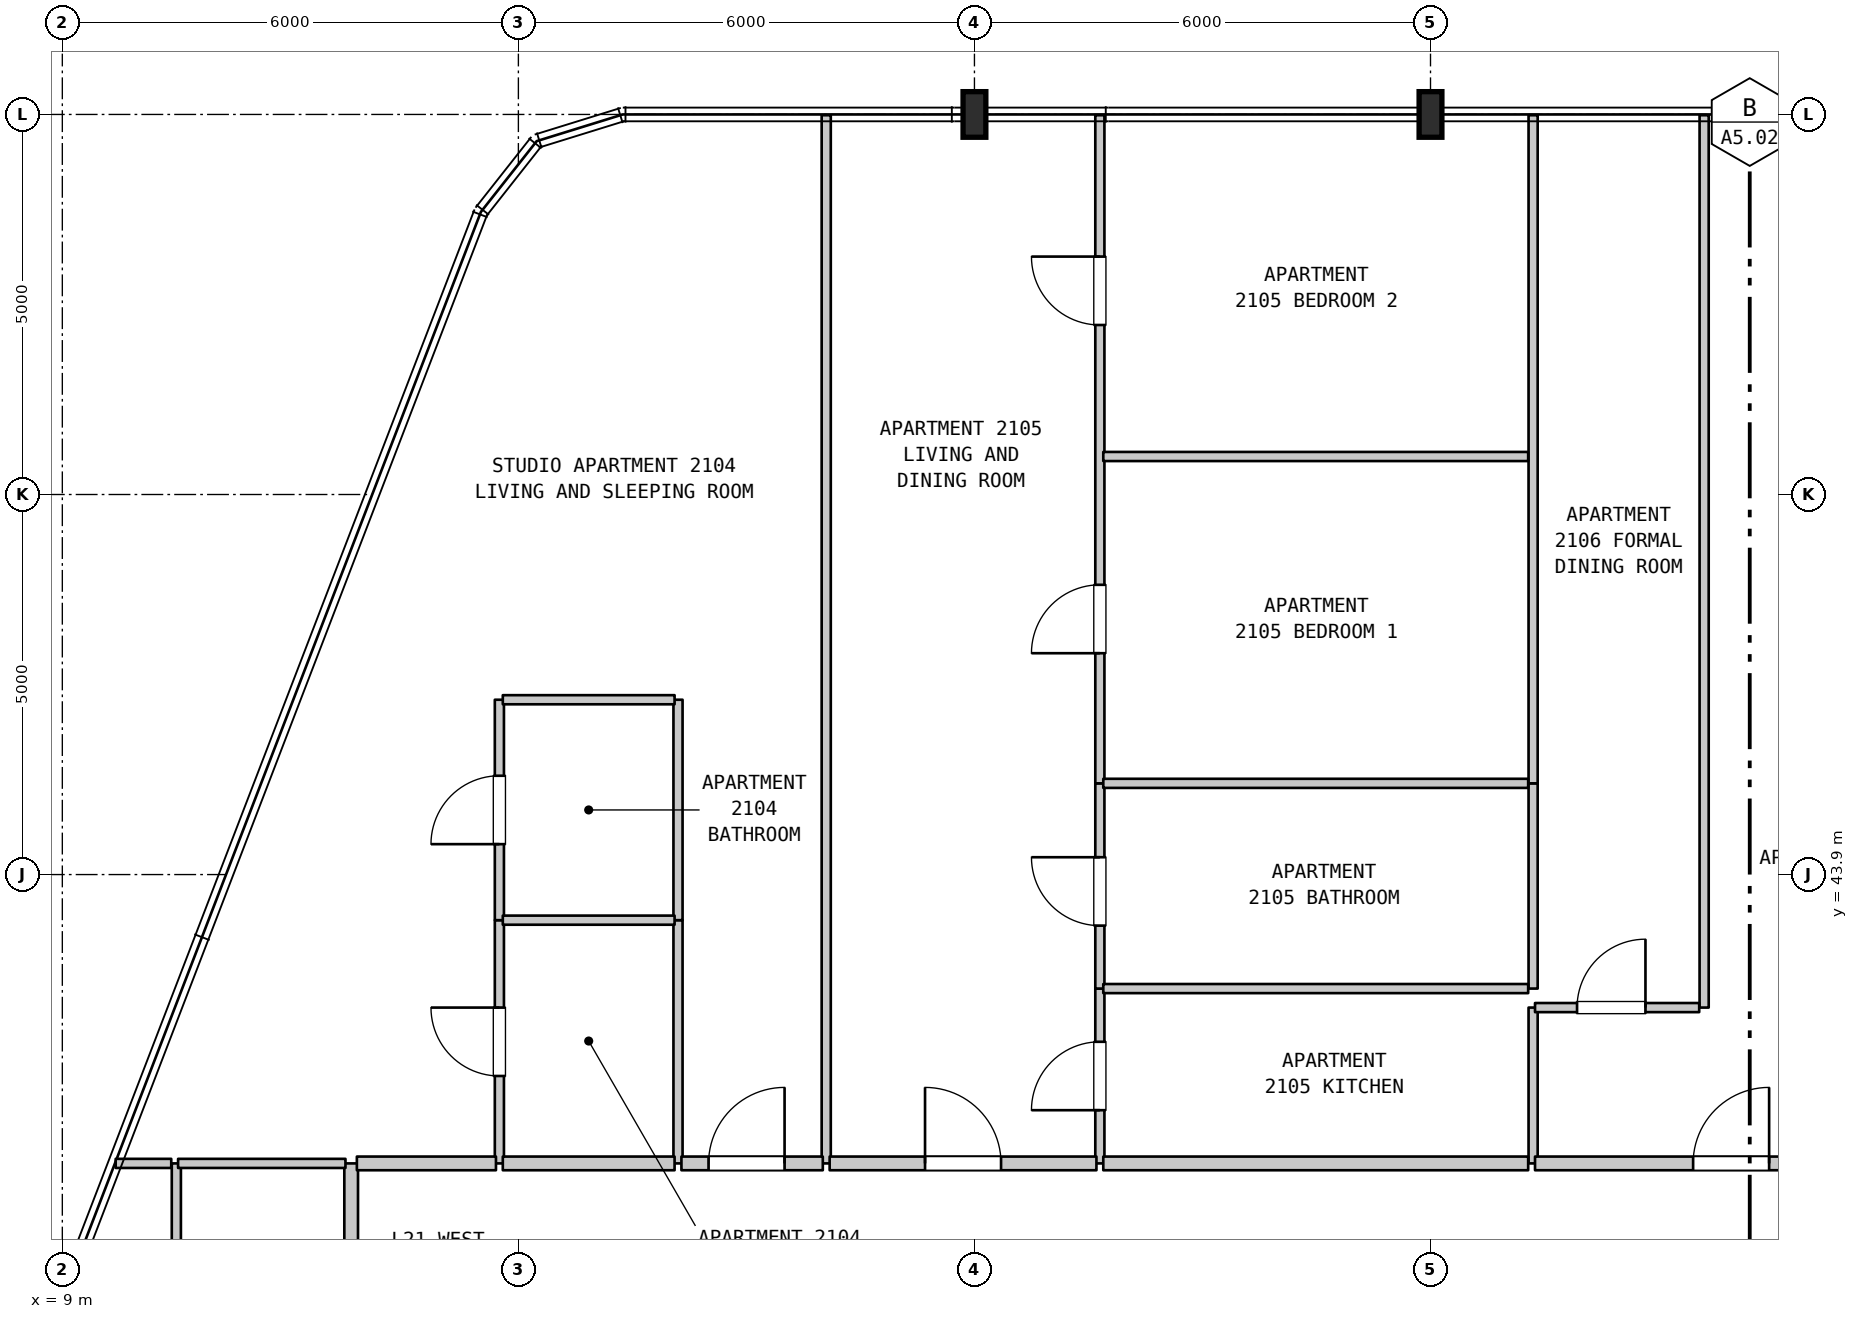
"""IFC4 building model, lengths in metres.
Left out: names, types, materials, properties, quantities, classifications, styles, units other than length and angle.
Written with IfcOpenShell. Run it as: python <this file> out.ifc"""

import sys

from ifc_helpers import new_model, si_unit, direction, frame, frame_2d, origin, origin_2d, place, context, subcontext, project, spatial, rectangle, i_section, extrude, element, fill, save


model = new_model("IFC4")
c1 = context("Model", 3, precision=1e-05, world=origin(), true_north=direction((0.0, 1.0)))
c2 = subcontext(c1, "Body", "Model", "MODEL_VIEW")
j1 = project(units=[si_unit("LENGTHUNIT", "METRE"), si_unit("PLANEANGLEUNIT", "RADIAN")], contexts=[c1])
p1 = place(None, origin())
s1 = spatial("IfcSite", under=j1, at=p1, CompositionType="ELEMENT")
p2 = place(p1, origin())
s2 = spatial("IfcBuilding", under=s1, at=p2, CompositionType="ELEMENT")
p3 = place(p2, frame((0.0, 0.0, 90.9)))
s3 = spatial("IfcBuildingStorey", under=s2, at=p3, CompositionType="ELEMENT", Elevation=90.9)
for number, where, z_axis, x_axis in (
    (1, (21.0, 53.9, 0.0), (0.0, 0.0, 1.0), (1.0, 0.0, 0.0)),
    (2, (27.0, 53.9, 0.0), (0.0, 0.0, 1.0), (1.0, 0.0, 0.0)),
):
    element("IfcColumn", number, at=place(p3, frame(where, z_axis=z_axis, x_axis=x_axis)), inside=s3, PredefinedType="COLUMN", context=c2, shape_type="SweptSolid", body=[
        extrude(i_section(OverallWidth=0.3, OverallDepth=0.6, WebThickness=0.015, FlangeThickness=0.03, FilletRadius=0.027, at=origin_2d()), origin(), (0.0, 0.0, 1.0), 3.7),
    ])
p4 = place(p3, frame((10.5, 31.45, 0.0), z_axis=(0.0, 0.0, 1.0), x_axis=(0.0, 1.0, 0.0)))
e3 = element("IfcWall", 3, at=p4, inside=s3, PredefinedType="PARTITIONING", context=c2, shape_type="SweptSolid", body=[
    extrude(rectangle(XDim=8.65, YDim=0.12, at=frame_2d((4.325, 0.0))), origin(), (0.0, 0.0, 1.0), 3.385),
])
p5 = place(p3, frame((12.8, 31.45, 0.0), z_axis=(0.0, 0.0, 1.0), x_axis=(0.0, 1.0, 0.0)))
e4 = element("IfcWall", 4, at=p5, inside=s3, PredefinedType="STANDARD", context=c2, shape_type="SweptSolid", body=[
    extrude(rectangle(XDim=8.65, YDim=0.18, at=frame_2d((4.325, 0.0))), origin(), (0.0, 0.0, 1.0), 3.385),
])
p6 = place(p3, frame((14.75, 40.1, 0.0), z_axis=(0.0, 0.0, 1.0), x_axis=(0.0, 1.0, 0.0)))
e5 = element("IfcWall", 5, at=p6, inside=s3, PredefinedType="PARTITIONING", context=c2, shape_type="SweptSolid", body=[
    extrude(rectangle(XDim=3.2, YDim=0.12, at=frame_2d((1.6, 0.0))), origin(), (0.0, 0.0, 1.0), 3.385),
])
p7 = place(p6, frame((1.15, 0.0, 0.0)))
e6 = element("IfcOpeningElement", 6, at=p7, cuts=e5, PredefinedType="OPENING", context=c2, shape_type="SweptSolid", body=[
    extrude(rectangle(XDim=0.9, YDim=2.15, at=frame_2d((0.45, 1.075))), frame((0.0, 0.07, 0.0), z_axis=(0.0, -1.0, 0.0), x_axis=(1.0, 0.0, 0.0)), (0.0, 0.0, 1.0), 0.14),
])
p8 = place(p3, frame((14.75, 43.3, 0.0), z_axis=(0.0, 0.0, 1.0), x_axis=(0.0, 1.0, 0.0)))
e7 = element("IfcWall", 7, at=p8, inside=s3, PredefinedType="PARTITIONING", context=c2, shape_type="SweptSolid", body=[
    extrude(rectangle(XDim=2.9, YDim=0.12, at=frame_2d((1.45, 0.0))), origin(), (0.0, 0.0, 1.0), 3.385),
])
p9 = place(p8, frame((1.0, 0.0, 0.0)))
e8 = element("IfcOpeningElement", 8, at=p9, cuts=e7, PredefinedType="OPENING", context=c2, shape_type="SweptSolid", body=[
    extrude(rectangle(XDim=0.9, YDim=2.1, at=frame_2d((0.45, 1.05))), frame((0.0, 0.07, 0.0), z_axis=(0.0, -1.0, 0.0), x_axis=(1.0, 0.0, 0.0)), (0.0, 0.0, 1.0), 0.14),
])
p10 = place(p3, frame((17.1, 40.1, 0.0), z_axis=(0.0, 0.0, 1.0), x_axis=(0.0, 1.0, 0.0)))
e9 = element("IfcWall", 9, at=p10, inside=s3, PredefinedType="PARTITIONING", context=c2, shape_type="SweptSolid", body=[
    extrude(rectangle(XDim=3.2, YDim=0.12, at=frame_2d((1.6, 0.0))), origin(), (0.0, 0.0, 1.0), 3.385),
])
p11 = place(p3, frame((17.1, 43.3, 0.0), z_axis=(0.0, 0.0, 1.0), x_axis=(0.0, 1.0, 0.0)))
e10 = element("IfcWall", 10, at=p11, inside=s3, PredefinedType="PARTITIONING", context=c2, shape_type="SweptSolid", body=[
    extrude(rectangle(XDim=2.9, YDim=0.12, at=frame_2d((1.45, 0.0))), origin(), (0.0, 0.0, 1.0), 3.385),
])
p12 = place(p3, frame((19.05, 40.1, 0.0), z_axis=(0.0, 0.0, 1.0), x_axis=(0.0, 1.0, 0.0)))
e11 = element("IfcWall", 11, at=p12, inside=s3, PredefinedType="PARTITIONING", context=c2, shape_type="SweptSolid", body=[
    extrude(rectangle(XDim=13.79, YDim=0.12, at=frame_2d((6.895, 0.0))), origin(), (0.0, 0.0, 1.0), 3.385),
])
p13 = place(p3, frame((22.65, 40.1, 0.0), z_axis=(0.0, 0.0, 1.0), x_axis=(0.0, 1.0, 0.0)))
e12 = element("IfcWall", 12, at=p13, inside=s3, PredefinedType="PARTITIONING", context=c2, shape_type="SweptSolid", body=[
    extrude(rectangle(XDim=2.3, YDim=0.12, at=frame_2d((1.15, 0.0))), origin(), (0.0, 0.0, 1.0), 3.385),
])
p14 = place(p13, frame((0.7, 0.0, 0.0)))
e13 = element("IfcOpeningElement", 13, at=p14, cuts=e12, PredefinedType="OPENING", context=c2, shape_type="SweptSolid", body=[
    extrude(rectangle(XDim=0.9, YDim=2.15, at=frame_2d((0.45, 1.075))), frame((0.0, 0.07, 0.0), z_axis=(0.0, -1.0, 0.0), x_axis=(1.0, 0.0, 0.0)), (0.0, 0.0, 1.0), 0.14),
])
p15 = place(p3, frame((22.65, 42.4, 0.0), z_axis=(0.0, 0.0, 1.0), x_axis=(0.0, 1.0, 0.0)))
e14 = element("IfcWall", 14, at=p15, inside=s3, PredefinedType="PARTITIONING", context=c2, shape_type="SweptSolid", body=[
    extrude(rectangle(XDim=2.7, YDim=0.12, at=frame_2d((1.35, 0.0))), origin(), (0.0, 0.0, 1.0), 3.385),
])
p16 = place(p15, frame((0.828, 0.0, 0.0)))
e15 = element("IfcOpeningElement", 15, at=p16, cuts=e14, PredefinedType="OPENING", context=c2, shape_type="SweptSolid", body=[
    extrude(rectangle(XDim=0.9, YDim=2.1, at=frame_2d((0.45, 1.05))), frame((0.0, 0.07, 0.0), z_axis=(0.0, -1.0, 0.0), x_axis=(1.0, 0.0, 0.0)), (0.0, 0.0, 1.0), 0.14),
])
p17 = place(p3, frame((22.65, 45.1, 0.0), z_axis=(0.0, 0.0, 1.0), x_axis=(0.0, 1.0, 0.0)))
e16 = element("IfcWall", 16, at=p17, inside=s3, PredefinedType="PARTITIONING", context=c2, shape_type="SweptSolid", body=[
    extrude(rectangle(XDim=8.79, YDim=0.12, at=frame_2d((4.395, 0.0))), origin(), (0.0, 0.0, 1.0), 3.385),
])
p18 = place(p17, frame((1.712, 0.0, 0.0)))
e17 = element("IfcOpeningElement", 17, at=p18, cuts=e16, PredefinedType="OPENING", context=c2, shape_type="SweptSolid", body=[
    extrude(rectangle(XDim=0.9, YDim=2.15, at=frame_2d((0.45, 1.075))), frame((0.0, 0.07, 0.0), z_axis=(0.0, -1.0, 0.0), x_axis=(1.0, 0.0, 0.0)), (0.0, 0.0, 1.0), 0.14),
])
p19 = place(p17, frame((6.03, 0.0, 0.0)))
e18 = element("IfcOpeningElement", 18, at=p19, cuts=e16, PredefinedType="OPENING", context=c2, shape_type="SweptSolid", body=[
    extrude(rectangle(XDim=0.9, YDim=2.15, at=frame_2d((0.45, 1.075))), frame((0.0, 0.07, 0.0), z_axis=(0.0, -1.0, 0.0), x_axis=(1.0, 0.0, 0.0)), (0.0, 0.0, 1.0), 0.14),
])
p20 = place(p3, frame((28.35, 40.1, 0.0), z_axis=(0.0, 0.0, 1.0), x_axis=(0.0, 1.0, 0.0)))
e19 = element("IfcWall", 19, at=p20, inside=s3, PredefinedType="PARTITIONING", context=c2, shape_type="SweptSolid", body=[
    extrude(rectangle(XDim=2.05, YDim=0.12, at=frame_2d((1.025, 0.0))), origin(), (0.0, 0.0, 1.0), 3.385),
])
p21 = place(p3, frame((28.35, 42.4, 0.0), z_axis=(0.0, 0.0, 1.0), x_axis=(0.0, 1.0, 0.0)))
e20 = element("IfcWall", 20, at=p21, inside=s3, PredefinedType="PARTITIONING", context=c2, shape_type="SweptSolid", body=[
    extrude(rectangle(XDim=2.7, YDim=0.12, at=frame_2d((1.35, 0.0))), origin(), (0.0, 0.0, 1.0), 3.385),
])
p22 = place(p3, frame((28.35, 45.1, 0.0), z_axis=(0.0, 0.0, 1.0), x_axis=(0.0, 1.0, 0.0)))
e21 = element("IfcWall", 21, at=p22, inside=s3, PredefinedType="PARTITIONING", context=c2, shape_type="SweptSolid", body=[
    extrude(rectangle(XDim=8.79, YDim=0.12, at=frame_2d((4.395, 0.0))), origin(), (0.0, 0.0, 1.0), 3.385),
])
p23 = place(p3, frame((30.6, 42.15, 0.0), z_axis=(0.0, 0.0, 1.0), x_axis=(0.0, 1.0, 0.0)))
e22 = element("IfcWall", 22, at=p23, inside=s3, PredefinedType="PARTITIONING", context=c2, shape_type="SweptSolid", body=[
    extrude(rectangle(XDim=11.74, YDim=0.12, at=frame_2d((5.87, 0.0))), origin(), (0.0, 0.0, 1.0), 3.385),
])
p24 = place(p3, frame((9.702, 40.1, 0.0), z_axis=(0.0, 0.0, 1.0), x_axis=(1.0, 0.0, 0.0)))
e23 = element("IfcWall", 23, at=p24, inside=s3, PredefinedType="PARTITIONING", context=c2, shape_type="SweptSolid", body=[
    extrude(rectangle(XDim=0.731, YDim=0.12, at=frame_2d((0.366, 0.0))), origin(), (0.0, 0.0, 1.0), 3.385),
])
p25 = place(p3, frame((10.523, 40.1, 0.0), z_axis=(0.0, 0.0, 1.0), x_axis=(1.0, 0.0, 0.0)))
e24 = element("IfcWall", 24, at=p25, inside=s3, PredefinedType="PARTITIONING", context=c2, shape_type="SweptSolid", body=[
    extrude(rectangle(XDim=2.202, YDim=0.12, at=frame_2d((1.101, 0.0))), origin(), (0.0, 0.0, 1.0), 3.385),
])
p26 = place(p3, frame((12.875, 40.1, 0.0), z_axis=(0.0, 0.0, 1.0), x_axis=(1.0, 0.0, 0.0)))
e25 = element("IfcWall", 25, at=p26, inside=s3, PredefinedType="STANDARD", context=c2, shape_type="SweptSolid", body=[
    extrude(rectangle(XDim=1.83, YDim=0.18, at=frame_2d((0.915, 0.0))), origin(), (0.0, 0.0, 1.0), 3.385),
])
p27 = place(p3, frame((14.795, 40.1, 0.0), z_axis=(0.0, 0.0, 1.0), x_axis=(1.0, 0.0, 0.0)))
e26 = element("IfcWall", 26, at=p27, inside=s3, PredefinedType="STANDARD", context=c2, shape_type="SweptSolid", body=[
    extrude(rectangle(XDim=2.26, YDim=0.18, at=frame_2d((1.13, 0.0))), origin(), (0.0, 0.0, 1.0), 3.385),
])
p28 = place(p3, frame((17.145, 40.1, 0.0), z_axis=(0.0, 0.0, 1.0), x_axis=(1.0, 0.0, 0.0)))
e27 = element("IfcWall", 27, at=p28, inside=s3, PredefinedType="STANDARD", context=c2, shape_type="SweptSolid", body=[
    extrude(rectangle(XDim=1.86, YDim=0.18, at=frame_2d((0.93, 0.0))), origin(), (0.0, 0.0, 1.0), 3.385),
])
p29 = place(p28, frame((0.357, 0.0, 0.0)))
e28 = element("IfcOpeningElement", 28, at=p29, cuts=e27, PredefinedType="OPENING", context=c2, shape_type="SweptSolid", body=[
    extrude(rectangle(XDim=1.0, YDim=2.15, at=frame_2d((0.5, 1.075))), frame((0.0, 0.1, 0.0), z_axis=(0.0, -1.0, 0.0), x_axis=(1.0, 0.0, 0.0)), (0.0, 0.0, 1.0), 0.2),
])
p30 = place(p3, frame((19.095, 40.1, 0.0), z_axis=(0.0, 0.0, 1.0), x_axis=(1.0, 0.0, 0.0)))
e29 = element("IfcWall", 29, at=p30, inside=s3, PredefinedType="STANDARD", context=c2, shape_type="SweptSolid", body=[
    extrude(rectangle(XDim=3.51, YDim=0.18, at=frame_2d((1.755, 0.0))), origin(), (0.0, 0.0, 1.0), 3.385),
])
p31 = place(p30, frame((1.255, 0.0, 0.0)))
e30 = element("IfcOpeningElement", 30, at=p31, cuts=e29, PredefinedType="OPENING", context=c2, shape_type="SweptSolid", body=[
    extrude(rectangle(XDim=1.0, YDim=2.15, at=frame_2d((0.5, 1.075))), frame((0.0, 0.1, 0.0), z_axis=(0.0, -1.0, 0.0), x_axis=(1.0, 0.0, 0.0)), (0.0, 0.0, 1.0), 0.2),
])
p32 = place(p3, frame((22.695, 40.1, 0.0), z_axis=(0.0, 0.0, 1.0), x_axis=(1.0, 0.0, 0.0)))
e31 = element("IfcWall", 31, at=p32, inside=s3, PredefinedType="STANDARD", context=c2, shape_type="SweptSolid", body=[
    extrude(rectangle(XDim=5.59, YDim=0.18, at=frame_2d((2.795, 0.0))), origin(), (0.0, 0.0, 1.0), 3.385),
])
p33 = place(p3, frame((28.375, 40.1, 0.0), z_axis=(0.0, 0.0, 1.0), x_axis=(1.0, 0.0, 0.0)))
e32 = element("IfcWall", 32, at=p33, inside=s3, PredefinedType="STANDARD", context=c2, shape_type="SweptSolid", body=[
    extrude(rectangle(XDim=5.095, YDim=0.18, at=frame_2d((2.547, 0.0))), origin(), (0.0, 0.0, 1.0), 3.385),
])
p34 = place(p33, frame((2.08, 0.0, 0.0)))
e33 = element("IfcOpeningElement", 33, at=p34, cuts=e32, PredefinedType="OPENING", context=c2, shape_type="SweptSolid", body=[
    extrude(rectangle(XDim=1.0, YDim=2.15, at=frame_2d((0.5, 1.075))), frame((0.0, 0.1, 0.0), z_axis=(0.0, -1.0, 0.0), x_axis=(1.0, 0.0, 0.0)), (0.0, 0.0, 1.0), 0.2),
])
p35 = place(p3, frame((28.375, 42.15, 0.0), z_axis=(0.0, 0.0, 1.0), x_axis=(1.0, 0.0, 0.0)))
e34 = element("IfcWall", 34, at=p35, inside=s3, PredefinedType="PARTITIONING", context=c2, shape_type="SweptSolid", body=[
    extrude(rectangle(XDim=2.16, YDim=0.12, at=frame_2d((1.08, 0.0))), origin(), (0.0, 0.0, 1.0), 3.385),
])
p36 = place(p35, frame((0.553, 0.0, 0.0)))
e35 = element("IfcOpeningElement", 35, at=p36, cuts=e34, PredefinedType="OPENING", context=c2, shape_type="SweptSolid", body=[
    extrude(rectangle(XDim=0.9, YDim=2.15, at=frame_2d((0.45, 1.075))), frame((0.0, 0.07, 0.0), z_axis=(0.0, -1.0, 0.0), x_axis=(1.0, 0.0, 0.0)), (0.0, 0.0, 1.0), 0.14),
])
p37 = place(p3, frame((22.695, 42.4, 0.0), z_axis=(0.0, 0.0, 1.0), x_axis=(1.0, 0.0, 0.0)))
e36 = element("IfcWall", 36, at=p37, inside=s3, PredefinedType="PARTITIONING", context=c2, shape_type="SweptSolid", body=[
    extrude(rectangle(XDim=5.59, YDim=0.12, at=frame_2d((2.795, 0.0))), origin(), (0.0, 0.0, 1.0), 3.385),
])
p38 = place(p3, frame((14.795, 43.3, 0.0), z_axis=(0.0, 0.0, 1.0), x_axis=(1.0, 0.0, 0.0)))
e37 = element("IfcWall", 37, at=p38, inside=s3, PredefinedType="PARTITIONING", context=c2, shape_type="SweptSolid", body=[
    extrude(rectangle(XDim=2.26, YDim=0.12, at=frame_2d((1.13, 0.0))), origin(), (0.0, 0.0, 1.0), 3.385),
])
p39 = place(p3, frame((22.695, 45.1, 0.0), z_axis=(0.0, 0.0, 1.0), x_axis=(1.0, 0.0, 0.0)))
e38 = element("IfcWall", 38, at=p39, inside=s3, PredefinedType="PARTITIONING", context=c2, shape_type="SweptSolid", body=[
    extrude(rectangle(XDim=5.59, YDim=0.12, at=frame_2d((2.795, 0.0))), origin(), (0.0, 0.0, 1.0), 3.385),
])
p40 = place(p3, frame((14.795, 46.2, 0.0), z_axis=(0.0, 0.0, 1.0), x_axis=(1.0, 0.0, 0.0)))
e39 = element("IfcWall", 39, at=p40, inside=s3, PredefinedType="PARTITIONING", context=c2, shape_type="SweptSolid", body=[
    extrude(rectangle(XDim=2.26, YDim=0.12, at=frame_2d((1.13, 0.0))), origin(), (0.0, 0.0, 1.0), 3.385),
])
p41 = place(p3, frame((22.695, 49.4, 0.0), z_axis=(0.0, 0.0, 1.0), x_axis=(1.0, 0.0, 0.0)))
e40 = element("IfcWall", 40, at=p41, inside=s3, PredefinedType="PARTITIONING", context=c2, shape_type="SweptSolid", body=[
    extrude(rectangle(XDim=5.59, YDim=0.12, at=frame_2d((2.795, 0.0))), origin(), (0.0, 0.0, 1.0), 3.385),
])
p42 = place(p7, origin())
e41 = element("IfcDoor", 41, at=p42, inside=s3, OperationType="SINGLE_SWING_RIGHT", PredefinedType="DOOR", context=c2, shape_type="SweptSolid", body=[
    extrude(rectangle(XDim=0.9, YDim=2.15, at=frame_2d((0.45, 1.075))), frame((0.0, 0.025, 0.0), z_axis=(0.0, -1.0, 0.0), x_axis=(1.0, 0.0, 0.0)), (0.0, 0.0, 1.0), 0.05),
])
fill(e6, e41)
p43 = place(p9, origin())
e42 = element("IfcDoor", 42, at=p43, inside=s3, OperationType="SINGLE_SWING_LEFT", PredefinedType="DOOR", context=c2, shape_type="SweptSolid", body=[
    extrude(rectangle(XDim=0.9, YDim=2.1, at=frame_2d((0.45, 1.05))), frame((0.0, 0.025, 0.0), z_axis=(0.0, -1.0, 0.0), x_axis=(1.0, 0.0, 0.0)), (0.0, 0.0, 1.0), 0.05),
])
fill(e8, e42)
p44 = place(p14, origin())
e43 = element("IfcDoor", 43, at=p44, inside=s3, OperationType="SINGLE_SWING_LEFT", PredefinedType="DOOR", context=c2, shape_type="SweptSolid", body=[
    extrude(rectangle(XDim=0.9, YDim=2.15, at=frame_2d((0.45, 1.075))), frame((0.0, 0.025, 0.0), z_axis=(0.0, -1.0, 0.0), x_axis=(1.0, 0.0, 0.0)), (0.0, 0.0, 1.0), 0.05),
])
fill(e13, e43)
p45 = place(p16, origin())
e44 = element("IfcDoor", 44, at=p45, inside=s3, OperationType="SINGLE_SWING_RIGHT", PredefinedType="DOOR", context=c2, shape_type="SweptSolid", body=[
    extrude(rectangle(XDim=0.9, YDim=2.1, at=frame_2d((0.45, 1.05))), frame((0.0, 0.025, 0.0), z_axis=(0.0, -1.0, 0.0), x_axis=(1.0, 0.0, 0.0)), (0.0, 0.0, 1.0), 0.05),
])
fill(e15, e44)
p46 = place(p18, origin())
e45 = element("IfcDoor", 45, at=p46, inside=s3, OperationType="SINGLE_SWING_LEFT", PredefinedType="DOOR", context=c2, shape_type="SweptSolid", body=[
    extrude(rectangle(XDim=0.9, YDim=2.15, at=frame_2d((0.45, 1.075))), frame((0.0, 0.025, 0.0), z_axis=(0.0, -1.0, 0.0), x_axis=(1.0, 0.0, 0.0)), (0.0, 0.0, 1.0), 0.05),
])
fill(e17, e45)
p47 = place(p19, origin())
e46 = element("IfcDoor", 46, at=p47, inside=s3, OperationType="SINGLE_SWING_RIGHT", PredefinedType="DOOR", context=c2, shape_type="SweptSolid", body=[
    extrude(rectangle(XDim=0.9, YDim=2.15, at=frame_2d((0.45, 1.075))), frame((0.0, 0.025, 0.0), z_axis=(0.0, -1.0, 0.0), x_axis=(1.0, 0.0, 0.0)), (0.0, 0.0, 1.0), 0.05),
])
fill(e18, e46)
p48 = place(p29, origin())
e47 = element("IfcDoor", 47, at=p48, inside=s3, OperationType="SINGLE_SWING_RIGHT", PredefinedType="DOOR", context=c2, shape_type="SweptSolid", body=[
    extrude(rectangle(XDim=1.0, YDim=2.15, at=frame_2d((0.5, 1.075))), frame((0.0, 0.025, 0.0), z_axis=(0.0, -1.0, 0.0), x_axis=(1.0, 0.0, 0.0)), (0.0, 0.0, 1.0), 0.05),
])
fill(e28, e47)
p49 = place(p31, origin())
e48 = element("IfcDoor", 48, at=p49, inside=s3, OperationType="SINGLE_SWING_LEFT", PredefinedType="DOOR", context=c2, shape_type="SweptSolid", body=[
    extrude(rectangle(XDim=1.0, YDim=2.15, at=frame_2d((0.5, 1.075))), frame((0.0, 0.025, 0.0), z_axis=(0.0, -1.0, 0.0), x_axis=(1.0, 0.0, 0.0)), (0.0, 0.0, 1.0), 0.05),
])
fill(e30, e48)
p50 = place(p34, origin())
e49 = element("IfcDoor", 49, at=p50, inside=s3, OperationType="SINGLE_SWING_RIGHT", PredefinedType="DOOR", context=c2, shape_type="SweptSolid", body=[
    extrude(rectangle(XDim=1.0, YDim=2.15, at=frame_2d((0.5, 1.075))), frame((0.0, 0.025, 0.0), z_axis=(0.0, -1.0, 0.0), x_axis=(1.0, 0.0, 0.0)), (0.0, 0.0, 1.0), 0.05),
])
fill(e33, e49)
p51 = place(p36, origin())
e50 = element("IfcDoor", 50, at=p51, inside=s3, OperationType="SINGLE_SWING_RIGHT", PredefinedType="DOOR", context=c2, shape_type="SweptSolid", body=[
    extrude(rectangle(XDim=0.9, YDim=2.15, at=frame_2d((0.45, 1.075))), frame((0.0, 0.025, 0.0), z_axis=(0.0, -1.0, 0.0), x_axis=(1.0, 0.0, 0.0)), (0.0, 0.0, 1.0), 0.05),
])
fill(e35, e50)
save(model, sys.argv[1])
